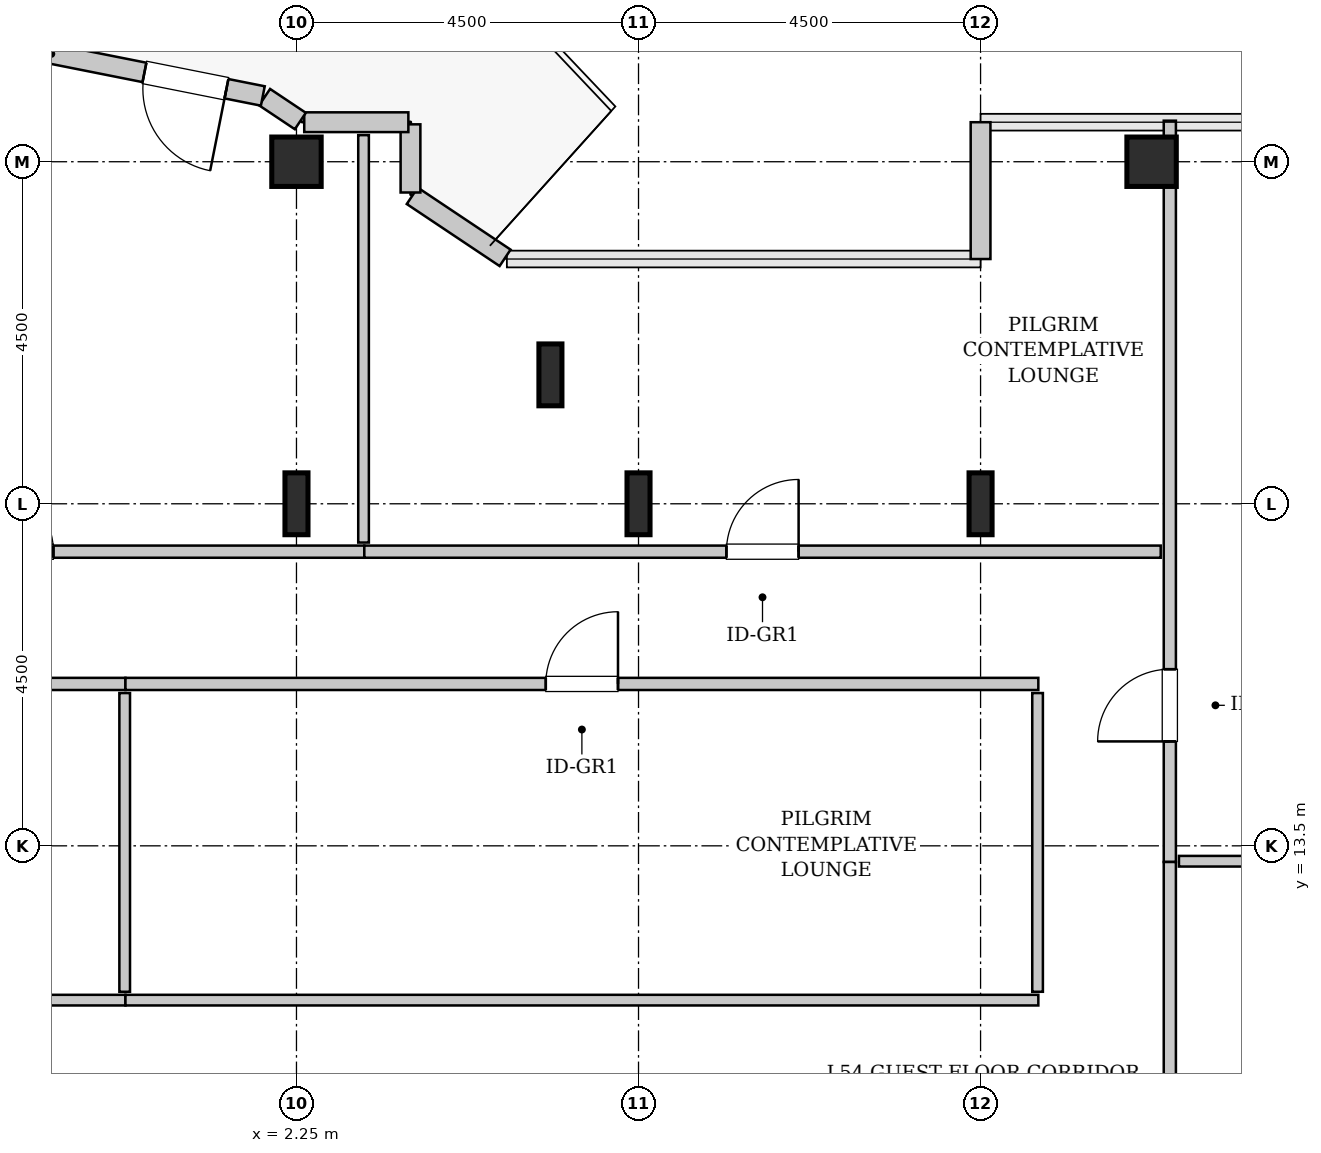
"""IFC4 building model, lengths in metres.
Left out: names, types, materials, properties, quantities, classifications, styles, units other than length and angle.
Written with IfcOpenShell. Run it as: python <this file> out.ifc"""

import sys

from ifc_helpers import new_model, si_unit, direction, frame, frame_2d, origin, origin_2d, place, context, subcontext, project, spatial, rectangle, hollow_rectangle, i_section, extrude, source, transform, mapped, element, fill, save


model = new_model("IFC4")
c1 = context("Model", 3, precision=1e-05, world=origin(), true_north=direction((0.0, 1.0)))
c2 = subcontext(c1, "Body", "Model", "MODEL_VIEW")
j1 = project(units=[si_unit("LENGTHUNIT", "METRE"), si_unit("PLANEANGLEUNIT", "RADIAN")], contexts=[c1])
p1 = place(None, origin())
s1 = spatial("IfcSite", under=j1, at=p1, CompositionType="ELEMENT")
p2 = place(p1, origin())
s2 = spatial("IfcBuilding", under=s1, at=p2, CompositionType="ELEMENT")
p3 = place(p2, frame((0.0, 0.0, 218.0)))
s3 = spatial("IfcBuildingStorey", under=s2, at=p3, CompositionType="ELEMENT", Elevation=218.0)
m1 = source(origin(), c2, "Body", "SweptSolid", [
    extrude(i_section(OverallWidth=0.303, OverallDepth=0.814, WebThickness=0.021, FlangeThickness=0.04, FilletRadius=0.03, at=origin_2d()), origin(), (0.0, 0.0, 1.0), 3.8),
])
p4 = place(p3, frame((2.25, 18.0, 0.0), z_axis=(0.0, 0.0, 1.0), x_axis=(1.0, 0.0, 0.0)))
e1 = element("IfcColumn", 1, at=p4, inside=s3, PredefinedType="COLUMN", context=c2, shape_type="MappedRepresentation", body=[
    mapped(m1, transform((0.0, 0.0, 0.0), x_axis=(1.0, 0.0, 0.0), y_axis=(0.0, 1.0, 0.0), z_axis=(0.0, 0.0, 1.0), scale=1.0)),
])
m2 = source(origin(), c2, "Body", "SweptSolid", [
    extrude(hollow_rectangle(XDim=0.65, YDim=0.65, WallThickness=0.032, InnerFilletRadius=0.032, OuterFilletRadius=0.064, at=origin_2d()), origin(), (0.0, 0.0, 1.0), 3.8),
])
p5 = place(p3, frame((2.25, 22.5, 0.0), z_axis=(0.0, 0.0, 1.0), x_axis=(1.0, 0.0, 0.0)))
e2 = element("IfcColumn", 2, at=p5, inside=s3, PredefinedType="COLUMN", context=c2, shape_type="MappedRepresentation", body=[
    mapped(m2, transform((0.0, 0.0, 0.0), x_axis=(1.0, 0.0, 0.0), y_axis=(0.0, 1.0, 0.0), z_axis=(0.0, 0.0, 1.0), scale=1.0)),
])
for number, where, z_axis, x_axis in (
    (3, (5.591, 19.696, 0.0), (0.0, 0.0, 1.0), (1.0, 0.0, 0.0)),
    (4, (6.75, 18.0, 0.0), (0.0, 0.0, 1.0), (1.0, 0.0, 0.0)),
    (5, (11.25, 18.0, 0.0), (0.0, 0.0, 1.0), (1.0, 0.0, 0.0)),
):
    element("IfcColumn", number, at=place(p3, frame(where, z_axis=z_axis, x_axis=x_axis)), inside=s3, PredefinedType="COLUMN", context=c2, shape_type="MappedRepresentation", body=[
        mapped(m1, transform((0.0, 0.0, 0.0), x_axis=(1.0, 0.0, 0.0), y_axis=(0.0, 1.0, 0.0), z_axis=(0.0, 0.0, 1.0), scale=1.0)),
    ])
p6 = place(p3, frame((13.5, 22.5, 0.0), z_axis=(0.0, 0.0, 1.0), x_axis=(1.0, 0.0, 0.0)))
e6 = element("IfcColumn", 6, at=p6, inside=s3, PredefinedType="COLUMN", context=c2, shape_type="MappedRepresentation", body=[
    mapped(m2, transform((0.0, 0.0, 0.0), x_axis=(1.0, 0.0, 0.0), y_axis=(0.0, 1.0, 0.0), z_axis=(0.0, 0.0, 1.0), scale=1.0)),
])
m3 = source(origin(), c2, "Body", "SweptSolid", [
    extrude(rectangle(XDim=1.8, YDim=0.26, at=frame_2d((0.9, 0.0))), origin(), (0.0, 0.0, 1.0), 3.55),
])
p7 = place(p3, frame((11.25, 23.02, 0.0), z_axis=(0.0, 0.0, 1.0), x_axis=(0.0, -1.0, 0.0)))
e7 = element("IfcWall", 7, at=p7, inside=s3, PredefinedType="SOLIDWALL", context=c2, shape_type="MappedRepresentation", body=[
    mapped(m3, transform((0.0, 0.0, 0.0), x_axis=(1.0, 0.0, 0.0), y_axis=(0.0, 1.0, 0.0), z_axis=(0.0, 0.0, 1.0), scale=1.0)),
])
m4 = source(origin(), c2, "Body", "SweptSolid", [
    extrude(rectangle(XDim=1.469, YDim=0.26, at=frame_2d((0.734, 0.0))), origin(), (0.0, 0.0, 1.0), 3.55),
])
p8 = place(p3, frame((4.995, 21.236, 0.0), z_axis=(0.0, 0.0, 1.0), x_axis=(-0.831461760506, 0.555581983884, 0.0)))
e8 = element("IfcWall", 8, at=p8, inside=s3, PredefinedType="SOLIDWALL", context=c2, shape_type="MappedRepresentation", body=[
    mapped(m4, transform((0.0, 0.0, 0.0), x_axis=(1.0, 0.0, 0.0), y_axis=(0.0, 1.0, 0.0), z_axis=(0.0, 0.0, 1.0), scale=1.0)),
])
m5 = source(origin(), c2, "Body", "SweptSolid", [
    extrude(rectangle(XDim=0.897, YDim=0.26, at=frame_2d((0.448, 0.0))), origin(), (0.0, 0.0, 1.0), 3.55),
])
p9 = place(p3, frame((3.75, 22.095, 0.0), z_axis=(0.0, 0.0, 1.0), x_axis=(0.0, 1.0, 0.0)))
e9 = element("IfcWall", 9, at=p9, inside=s3, PredefinedType="SOLIDWALL", context=c2, shape_type="MappedRepresentation", body=[
    mapped(m5, transform((0.0, 0.0, 0.0), x_axis=(1.0, 0.0, 0.0), y_axis=(0.0, 1.0, 0.0), z_axis=(0.0, 0.0, 1.0), scale=1.0)),
])
m6 = source(origin(), c2, "Body", "SweptSolid", [
    extrude(rectangle(XDim=1.37, YDim=0.26, at=frame_2d((0.685, 0.0))), origin(), (0.0, 0.0, 1.0), 3.55),
])
p10 = place(p3, frame((3.722, 23.02, 0.0), z_axis=(0.0, 0.0, 1.0), x_axis=(-1.0, 0.0, 0.0)))
e10 = element("IfcWall", 10, at=p10, inside=s3, PredefinedType="SOLIDWALL", context=c2, shape_type="MappedRepresentation", body=[
    mapped(m6, transform((0.0, 0.0, 0.0), x_axis=(1.0, 0.0, 0.0), y_axis=(0.0, 1.0, 0.0), z_axis=(0.0, 0.0, 1.0), scale=1.0)),
])
m7 = source(origin(), c2, "Body", "SweptSolid", [
    extrude(rectangle(XDim=0.565, YDim=0.26, at=frame_2d((0.283, 0.0))), origin(), (0.0, 0.0, 1.0), 3.55),
])
p11 = place(p3, frame((2.301, 23.036, 0.0), z_axis=(0.0, 0.0, 1.0), x_axis=(-0.831651492666, 0.555297933317, 0.0)))
e11 = element("IfcWall", 11, at=p11, inside=s3, PredefinedType="SOLIDWALL", context=c2, shape_type="MappedRepresentation", body=[
    mapped(m7, transform((0.0, 0.0, 0.0), x_axis=(1.0, 0.0, 0.0), y_axis=(0.0, 1.0, 0.0), z_axis=(0.0, 0.0, 1.0), scale=1.0)),
])
m8 = source(origin(), c2, "Body", "SweptSolid", [
    extrude(rectangle(XDim=4.137, YDim=0.26, at=frame_2d((2.068, 0.0))), origin(), (0.0, 0.0, 1.0), 3.55),
])
p12 = place(p3, frame((1.807, 23.365, 0.0), z_axis=(0.0, 0.0, 1.0), x_axis=(-0.980782170794, 0.195105954428, 0.0)))
e12 = element("IfcWall", 12, at=p12, inside=s3, PredefinedType="SOLIDWALL", context=c2, shape_type="MappedRepresentation", body=[
    mapped(m8, transform((0.0, 0.0, 0.0), x_axis=(1.0, 0.0, 0.0), y_axis=(0.0, 1.0, 0.0), z_axis=(0.0, 0.0, 1.0), scale=1.0)),
])
p13 = place(p12, frame((0.488, 0.0, 0.0)))
e13 = element("IfcOpeningElement", 13, at=p13, cuts=e12, PredefinedType="OPENING", context=c2, shape_type="SweptSolid", body=[
    extrude(rectangle(XDim=1.1, YDim=2.2, at=frame_2d((0.55, 1.1))), frame((0.0, 0.14, 0.0), z_axis=(0.0, -1.0, 0.0), x_axis=(1.0, 0.0, 0.0)), (0.0, 0.0, 1.0), 0.28),
])
m9 = source(origin(), c2, "Body", "SweptSolid", [
    extrude(rectangle(XDim=9.752, YDim=0.16, at=frame_2d((4.876, 0.0))), origin(), (0.0, 0.0, 1.0), 3.535),
])
p14 = place(p3, frame((13.74, 13.288, 0.0), z_axis=(0.0, 0.0, 1.0), x_axis=(0.0, 1.0, 0.0)))
e14 = element("IfcWall", 14, at=p14, inside=s3, PredefinedType="PARTITIONING", context=c2, shape_type="MappedRepresentation", body=[
    mapped(m9, transform((0.0, 0.0, 0.0), x_axis=(1.0, 0.0, 0.0), y_axis=(0.0, 1.0, 0.0), z_axis=(0.0, 0.0, 1.0), scale=1.0)),
])
p15 = place(p14, frame((1.586, 0.0, 0.0)))
e15 = element("IfcOpeningElement", 15, at=p15, cuts=e14, PredefinedType="OPENING", context=c2, shape_type="SweptSolid", body=[
    extrude(rectangle(XDim=0.95, YDim=2.1, at=frame_2d((0.475, 1.05))), frame((0.0, 0.09, 0.0), z_axis=(0.0, -1.0, 0.0), x_axis=(1.0, 0.0, 0.0)), (0.0, 0.0, 1.0), 0.18),
])
m10 = source(origin(), c2, "Body", "SweptSolid", [
    extrude(rectangle(XDim=11.43, YDim=0.14, at=frame_2d((5.715, 0.0))), origin(), (0.0, 0.0, 1.0), 2.925),
])
p16 = place(p3, frame((13.86, 13.298, 0.0), z_axis=(0.0, 0.0, 1.0), x_axis=(1.0, 0.0, 0.0)))
e16 = element("IfcWall", 16, at=p16, inside=s3, PredefinedType="PARTITIONING", context=c2, shape_type="MappedRepresentation", body=[
    mapped(m10, transform((0.0, 0.0, 0.0), x_axis=(1.0, 0.0, 0.0), y_axis=(0.0, 1.0, 0.0), z_axis=(0.0, 0.0, 1.0), scale=1.0)),
])
m11 = source(origin(), c2, "Body", "SweptSolid", [
    extrude(rectangle(XDim=9.693, YDim=0.16, at=frame_2d((4.846, 0.0))), origin(), (0.0, 0.0, 1.0), 3.535),
])
p17 = place(p3, frame((13.74, 3.595, 0.0), z_axis=(0.0, 0.0, 1.0), x_axis=(0.0, 1.0, 0.0)))
e17 = element("IfcWall", 17, at=p17, inside=s3, PredefinedType="PARTITIONING", context=c2, shape_type="MappedRepresentation", body=[
    mapped(m11, transform((0.0, 0.0, 0.0), x_axis=(1.0, 0.0, 0.0), y_axis=(0.0, 1.0, 0.0), z_axis=(0.0, 0.0, 1.0), scale=1.0)),
])
p18 = place(p17, frame((4.371, 0.0, 0.0)))
e18 = element("IfcOpeningElement", 18, at=p18, cuts=e17, PredefinedType="OPENING", context=c2, shape_type="SweptSolid", body=[
    extrude(rectangle(XDim=0.95, YDim=2.1, at=frame_2d((0.475, 1.05))), frame((0.0, 0.09, 0.0), z_axis=(0.0, -1.0, 0.0), x_axis=(1.0, 0.0, 0.0)), (0.0, 0.0, 1.0), 0.18),
])
m12 = source(origin(), c2, "Body", "SweptSolid", [
    extrude(rectangle(XDim=10.583, YDim=0.16, at=frame_2d((5.291, 0.0))), origin(), (0.0, 0.0, 1.0), 3.535),
])
p19 = place(p3, frame((-7.44, 17.37, 0.0), z_axis=(0.0, 0.0, 1.0), x_axis=(1.0, 0.0, 0.0)))
e19 = element("IfcWall", 19, at=p19, inside=s3, PredefinedType="PARTITIONING", context=c2, shape_type="MappedRepresentation", body=[
    mapped(m12, transform((0.0, 0.0, 0.0), x_axis=(1.0, 0.0, 0.0), y_axis=(0.0, 1.0, 0.0), z_axis=(0.0, 0.0, 1.0), scale=1.0)),
])
p20 = place(p19, frame((5.542, 0.0, 0.0)))
e20 = element("IfcOpeningElement", 20, at=p20, cuts=e19, PredefinedType="OPENING", context=c2, shape_type="SweptSolid", body=[
    extrude(rectangle(XDim=0.95, YDim=2.1, at=frame_2d((0.475, 1.05))), frame((0.0, 0.09, 0.0), z_axis=(0.0, -1.0, 0.0), x_axis=(1.0, 0.0, 0.0)), (0.0, 0.0, 1.0), 0.18),
])
m13 = source(origin(), c2, "Body", "SweptSolid", [
    extrude(rectangle(XDim=5.36, YDim=0.14, at=frame_2d((2.68, 0.0))), origin(), (0.0, 0.0, 1.0), 3.535),
])
p21 = place(p3, frame((3.133, 17.49, 0.0), z_axis=(0.0, 0.0, 1.0), x_axis=(0.0, 1.0, 0.0)))
e21 = element("IfcWall", 21, at=p21, inside=s3, PredefinedType="PARTITIONING", context=c2, shape_type="MappedRepresentation", body=[
    mapped(m13, transform((0.0, 0.0, 0.0), x_axis=(1.0, 0.0, 0.0), y_axis=(0.0, 1.0, 0.0), z_axis=(0.0, 0.0, 1.0), scale=1.0)),
])
m14 = source(origin(), c2, "Body", "SweptSolid", [
    extrude(rectangle(XDim=10.478, YDim=0.16, at=frame_2d((5.239, 0.0))), origin(), (0.0, 0.0, 1.0), 3.535),
])
p22 = place(p3, frame((3.143, 17.37, 0.0), z_axis=(0.0, 0.0, 1.0), x_axis=(1.0, 0.0, 0.0)))
e22 = element("IfcWall", 22, at=p22, inside=s3, PredefinedType="PARTITIONING", context=c2, shape_type="MappedRepresentation", body=[
    mapped(m14, transform((0.0, 0.0, 0.0), x_axis=(1.0, 0.0, 0.0), y_axis=(0.0, 1.0, 0.0), z_axis=(0.0, 0.0, 1.0), scale=1.0)),
])
p23 = place(p22, frame((4.764, 0.0, 0.0)))
e23 = element("IfcOpeningElement", 23, at=p23, cuts=e22, PredefinedType="OPENING", context=c2, shape_type="SweptSolid", body=[
    extrude(rectangle(XDim=0.95, YDim=2.1, at=frame_2d((0.475, 1.05))), frame((0.0, 0.09, 0.0), z_axis=(0.0, -1.0, 0.0), x_axis=(1.0, 0.0, 0.0)), (0.0, 0.0, 1.0), 0.18),
])
m15 = source(origin(), c2, "Body", "SweptSolid", [
    extrude(rectangle(XDim=12.01, YDim=0.16, at=frame_2d((6.005, 0.0))), origin(), (0.0, 0.0, 1.0), 3.535),
])
p24 = place(p3, frame((-12.01, 15.63, 0.0), z_axis=(0.0, 0.0, 1.0), x_axis=(1.0, 0.0, 0.0)))
e24 = element("IfcWall", 24, at=p24, inside=s3, PredefinedType="PARTITIONING", context=c2, shape_type="MappedRepresentation", body=[
    mapped(m15, transform((0.0, 0.0, 0.0), x_axis=(1.0, 0.0, 0.0), y_axis=(0.0, 1.0, 0.0), z_axis=(0.0, 0.0, 1.0), scale=1.0)),
])
p25 = place(p24, frame((5.53, 0.0, 0.0)))
e25 = element("IfcOpeningElement", 25, at=p25, cuts=e24, PredefinedType="OPENING", context=c2, shape_type="SweptSolid", body=[
    extrude(rectangle(XDim=0.95, YDim=2.1, at=frame_2d((0.475, 1.05))), frame((0.0, 0.09, 0.0), z_axis=(0.0, -1.0, 0.0), x_axis=(1.0, 0.0, 0.0)), (0.0, 0.0, 1.0), 0.18),
])
m16 = source(origin(), c2, "Body", "SweptSolid", [
    extrude(rectangle(XDim=12.01, YDim=0.14, at=frame_2d((6.005, 0.0))), origin(), (0.0, 0.0, 1.0), 3.535),
])
p26 = place(p3, frame((-12.01, 11.47, 0.0), z_axis=(0.0, 0.0, 1.0), x_axis=(1.0, 0.0, 0.0)))
e26 = element("IfcWall", 26, at=p26, inside=s3, PredefinedType="PARTITIONING", context=c2, shape_type="MappedRepresentation", body=[
    mapped(m16, transform((0.0, 0.0, 0.0), x_axis=(1.0, 0.0, 0.0), y_axis=(0.0, 1.0, 0.0), z_axis=(0.0, 0.0, 1.0), scale=1.0)),
])
m17 = source(origin(), c2, "Body", "SweptSolid", [
    extrude(rectangle(XDim=3.93, YDim=0.14, at=frame_2d((1.965, 0.0))), origin(), (0.0, 0.0, 1.0), 3.535),
])
p27 = place(p3, frame((-0.01, 11.58, 0.0), z_axis=(0.0, 0.0, 1.0), x_axis=(0.0, 1.0, 0.0)))
e27 = element("IfcWall", 27, at=p27, inside=s3, PredefinedType="PARTITIONING", context=c2, shape_type="MappedRepresentation", body=[
    mapped(m17, transform((0.0, 0.0, 0.0), x_axis=(1.0, 0.0, 0.0), y_axis=(0.0, 1.0, 0.0), z_axis=(0.0, 0.0, 1.0), scale=1.0)),
])
p28 = place(p3, frame((0.0, 15.63, 0.0), z_axis=(0.0, 0.0, 1.0), x_axis=(1.0, 0.0, 0.0)))
e28 = element("IfcWall", 28, at=p28, inside=s3, PredefinedType="PARTITIONING", context=c2, shape_type="MappedRepresentation", body=[
    mapped(m15, transform((0.0, 0.0, 0.0), x_axis=(1.0, 0.0, 0.0), y_axis=(0.0, 1.0, 0.0), z_axis=(0.0, 0.0, 1.0), scale=1.0)),
])
p29 = place(p28, frame((5.53, 0.0, 0.0)))
e29 = element("IfcOpeningElement", 29, at=p29, cuts=e28, PredefinedType="OPENING", context=c2, shape_type="SweptSolid", body=[
    extrude(rectangle(XDim=0.95, YDim=2.1, at=frame_2d((0.475, 1.05))), frame((0.0, 0.09, 0.0), z_axis=(0.0, -1.0, 0.0), x_axis=(1.0, 0.0, 0.0)), (0.0, 0.0, 1.0), 0.18),
])
p30 = place(p3, frame((0.0, 11.47, 0.0), z_axis=(0.0, 0.0, 1.0), x_axis=(1.0, 0.0, 0.0)))
e30 = element("IfcWall", 30, at=p30, inside=s3, PredefinedType="PARTITIONING", context=c2, shape_type="MappedRepresentation", body=[
    mapped(m16, transform((0.0, 0.0, 0.0), x_axis=(1.0, 0.0, 0.0), y_axis=(0.0, 1.0, 0.0), z_axis=(0.0, 0.0, 1.0), scale=1.0)),
])
p31 = place(p3, frame((12.0, 11.58, 0.0), z_axis=(0.0, 0.0, 1.0), x_axis=(0.0, 1.0, 0.0)))
e31 = element("IfcWall", 31, at=p31, inside=s3, PredefinedType="PARTITIONING", context=c2, shape_type="MappedRepresentation", body=[
    mapped(m17, transform((0.0, 0.0, 0.0), x_axis=(1.0, 0.0, 0.0), y_axis=(0.0, 1.0, 0.0), z_axis=(0.0, 0.0, 1.0), scale=1.0)),
])
m18 = source(origin(), c2, "Body", "SweptSolid", [
    extrude(rectangle(XDim=1.1, YDim=2.2, at=frame_2d((0.55, 1.1))), frame((0.0, 0.025, 0.0), z_axis=(0.0, -1.0, 0.0), x_axis=(1.0, 0.0, 0.0)), (0.0, 0.0, 1.0), 0.05),
])
p32 = place(p13, origin())
e32 = element("IfcDoor", 32, at=p32, inside=s3, OperationType="SINGLE_SWING_LEFT", PredefinedType="DOOR", context=c2, shape_type="MappedRepresentation", body=[
    mapped(m18, transform((0.0, 0.0, 0.0), x_axis=(1.0, 0.0, 0.0), y_axis=(0.0, 1.0, 0.0), z_axis=(0.0, 0.0, 1.0), scale=1.0)),
])
fill(e13, e32)
m19 = source(origin(), c2, "Body", "SweptSolid", [
    extrude(rectangle(XDim=0.95, YDim=2.1, at=frame_2d((0.475, 1.05))), frame((0.0, 0.025, 0.0), z_axis=(0.0, -1.0, 0.0), x_axis=(1.0, 0.0, 0.0)), (0.0, 0.0, 1.0), 0.05),
])
p33 = place(p15, origin())
e33 = element("IfcDoor", 33, at=p33, inside=s3, OperationType="SINGLE_SWING_LEFT", PredefinedType="DOOR", context=c2, shape_type="MappedRepresentation", body=[
    mapped(m19, transform((0.0, 0.0, 0.0), x_axis=(1.0, 0.0, 0.0), y_axis=(0.0, 1.0, 0.0), z_axis=(0.0, 0.0, 1.0), scale=1.0)),
])
fill(e15, e33)
p34 = place(p20, origin())
e34 = element("IfcDoor", 34, at=p34, inside=s3, OperationType="SINGLE_SWING_LEFT", PredefinedType="DOOR", context=c2, shape_type="MappedRepresentation", body=[
    mapped(m19, transform((0.0, 0.0, 0.0), x_axis=(1.0, 0.0, 0.0), y_axis=(0.0, 1.0, 0.0), z_axis=(0.0, 0.0, 1.0), scale=1.0)),
])
fill(e20, e34)
p35 = place(p23, origin())
e35 = element("IfcDoor", 35, at=p35, inside=s3, OperationType="SINGLE_SWING_RIGHT", PredefinedType="DOOR", context=c2, shape_type="MappedRepresentation", body=[
    mapped(m19, transform((0.0, 0.0, 0.0), x_axis=(1.0, 0.0, 0.0), y_axis=(0.0, 1.0, 0.0), z_axis=(0.0, 0.0, 1.0), scale=1.0)),
])
fill(e23, e35)
p36 = place(p29, origin())
e36 = element("IfcDoor", 36, at=p36, inside=s3, OperationType="SINGLE_SWING_RIGHT", PredefinedType="DOOR", context=c2, shape_type="MappedRepresentation", body=[
    mapped(m19, transform((0.0, 0.0, 0.0), x_axis=(1.0, 0.0, 0.0), y_axis=(0.0, 1.0, 0.0), z_axis=(0.0, 0.0, 1.0), scale=1.0)),
])
fill(e29, e36)
save(model, sys.argv[1])
